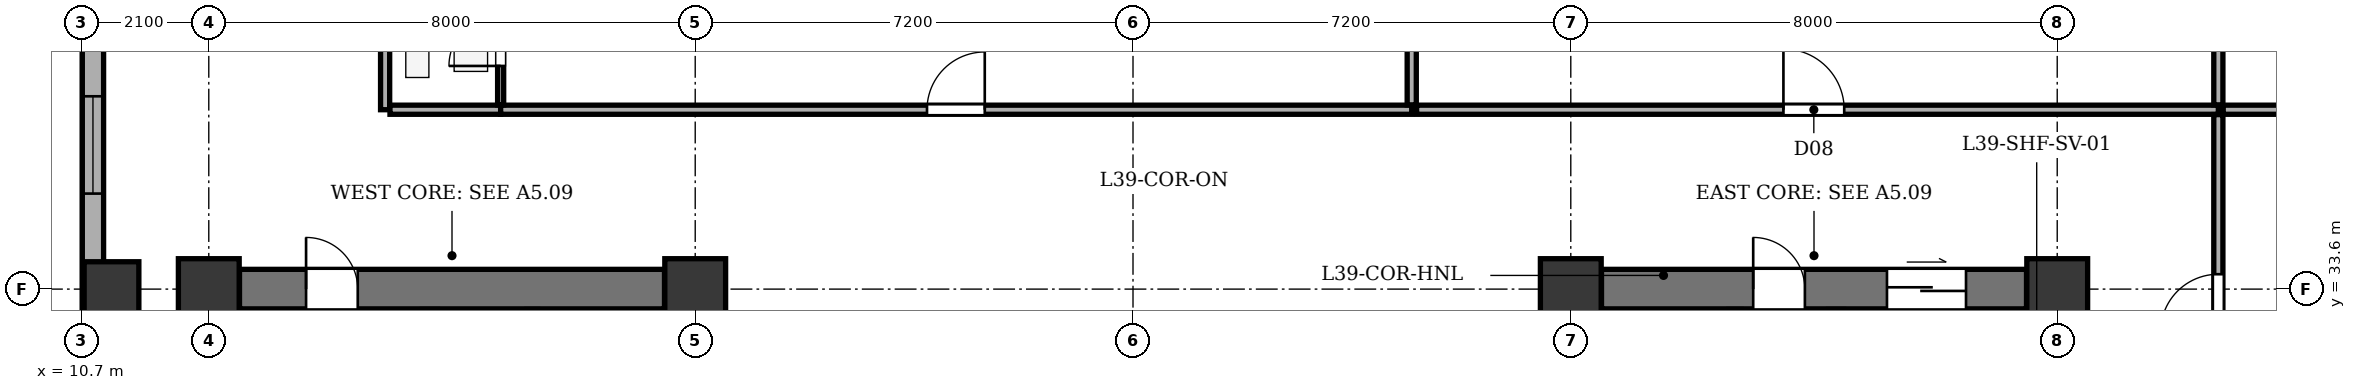
"""IFC4 building model, lengths in metres.
Left out: names, types, materials, properties, quantities, classifications, styles, units other than length and angle.
Written with IfcOpenShell. Run it as: python <this file> out.ifc"""

import sys

from ifc_helpers import new_model, si_unit, direction, frame, frame_2d, origin, origin_2d, place, context, subcontext, project, spatial, rectangle, extrude, element, fill, save


model = new_model("IFC4")
c1 = context("Model", 3, precision=1e-05, world=origin(), true_north=direction((0.0, 1.0)))
c2 = subcontext(c1, "Body", "Model", "MODEL_VIEW")
j1 = project(units=[si_unit("LENGTHUNIT", "METRE"), si_unit("PLANEANGLEUNIT", "RADIAN")], contexts=[c1])
p1 = place(None, origin())
s1 = spatial("IfcSite", under=j1, at=p1, CompositionType="ELEMENT")
p2 = place(p1, origin())
s2 = spatial("IfcBuilding", under=s1, at=p2, CompositionType="ELEMENT")
p3 = place(p2, frame((0.0, 0.0, 155.3)))
s3 = spatial("IfcBuildingStorey", under=s2, at=p3, CompositionType="ELEMENT", Elevation=155.3)
for number, where, z_axis, x_axis in (
    (1, (12.8, 33.6, 0.0), (0.0, 0.0, 1.0), (1.0, 0.0, 0.0)),
    (2, (20.8, 33.6, 0.0), (0.0, 0.0, 1.0), (1.0, 0.0, 0.0)),
    (3, (35.2, 33.6, 0.0), (0.0, 0.0, 1.0), (1.0, 0.0, 0.0)),
    (4, (43.2, 33.6, 0.0), (0.0, 0.0, 1.0), (1.0, 0.0, 0.0)),
):
    element("IfcColumn", number, at=place(p3, frame(where, z_axis=z_axis, x_axis=x_axis)), inside=s3, PredefinedType="COLUMN", context=c2, shape_type="SweptSolid", body=[
        extrude(rectangle(XDim=1.0, YDim=1.0, at=origin_2d()), origin(), (0.0, 0.0, 1.0), 3.5),
    ])
p4 = place(p3, frame((11.2, 33.6, 0.0), z_axis=(0.0, 0.0, 1.0), x_axis=(1.0, 0.0, 0.0)))
e5 = element("IfcColumn", 5, at=p4, inside=s3, PredefinedType="COLUMN", context=c2, shape_type="SweptSolid", body=[
    extrude(rectangle(XDim=0.9, YDim=0.9, at=origin_2d()), origin(), (0.0, 0.0, 1.0), 3.5),
])
p5 = place(p3, frame((10.895, 6.5, 0.0), z_axis=(0.0, 0.0, 1.0), x_axis=(0.0, 1.0, 0.0)))
e6 = element("IfcWall", 6, at=p5, inside=s3, PredefinedType="STANDARD", context=c2, shape_type="SweptSolid", body=[
    extrude(rectangle(XDim=35.0, YDim=0.35, at=frame_2d((17.5, 0.0))), origin(), (0.0, 0.0, 1.0), 2.785),
])
p6 = place(p5, frame((3.31, 0.0, 0.75)))
e7 = element("IfcOpeningElement", 7, at=p6, cuts=e6, PredefinedType="OPENING", context=c2, shape_type="SweptSolid", body=[
    extrude(rectangle(XDim=1.6, YDim=1.75, at=frame_2d((0.8, 0.875))), frame((0.0, 0.185, 0.0), z_axis=(0.0, -1.0, 0.0), x_axis=(1.0, 0.0, 0.0)), (0.0, 0.0, 1.0), 0.37),
])
p7 = place(p5, frame((9.216, 0.0, 0.75)))
e8 = element("IfcOpeningElement", 8, at=p7, cuts=e6, PredefinedType="OPENING", context=c2, shape_type="SweptSolid", body=[
    extrude(rectangle(XDim=2.1, YDim=1.75, at=frame_2d((1.05, 0.875))), frame((0.0, 0.185, 0.0), z_axis=(0.0, -1.0, 0.0), x_axis=(1.0, 0.0, 0.0)), (0.0, 0.0, 1.0), 0.37),
])
p8 = place(p5, frame((17.164, 0.0, 0.75)))
e9 = element("IfcOpeningElement", 9, at=p8, cuts=e6, PredefinedType="OPENING", context=c2, shape_type="SweptSolid", body=[
    extrude(rectangle(XDim=1.6, YDim=1.75, at=frame_2d((0.8, 0.875))), frame((0.0, 0.185, 0.0), z_axis=(0.0, -1.0, 0.0), x_axis=(1.0, 0.0, 0.0)), (0.0, 0.0, 1.0), 0.37),
])
p9 = place(p5, frame((22.386, 0.0, 0.75)))
e10 = element("IfcOpeningElement", 10, at=p9, cuts=e6, PredefinedType="OPENING", context=c2, shape_type="SweptSolid", body=[
    extrude(rectangle(XDim=2.1, YDim=1.75, at=frame_2d((1.05, 0.875))), frame((0.0, 0.185, 0.0), z_axis=(0.0, -1.0, 0.0), x_axis=(1.0, 0.0, 0.0)), (0.0, 0.0, 1.0), 0.37),
])
p10 = place(p5, frame((28.671, 0.0, 0.75)))
e11 = element("IfcOpeningElement", 11, at=p10, cuts=e6, PredefinedType="OPENING", context=c2, shape_type="SweptSolid", body=[
    extrude(rectangle(XDim=1.6, YDim=1.75, at=frame_2d((0.8, 0.875))), frame((0.0, 0.185, 0.0), z_axis=(0.0, -1.0, 0.0), x_axis=(1.0, 0.0, 0.0)), (0.0, 0.0, 1.0), 0.37),
])
p11 = place(p5, frame((31.755, 0.0, 0.75)))
e12 = element("IfcOpeningElement", 12, at=p11, cuts=e6, PredefinedType="OPENING", context=c2, shape_type="SweptSolid", body=[
    extrude(rectangle(XDim=1.6, YDim=1.75, at=frame_2d((0.8, 0.875))), frame((0.0, 0.185, 0.0), z_axis=(0.0, -1.0, 0.0), x_axis=(1.0, 0.0, 0.0)), (0.0, 0.0, 1.0), 0.37),
])
p12 = place(p3, frame((13.305, 33.6, 0.0), z_axis=(0.0, 0.0, 1.0), x_axis=(1.0, 0.0, 0.0)))
e13 = element("IfcWall", 13, at=p12, inside=s3, PredefinedType="SHEAR", context=c2, shape_type="SweptSolid", body=[
    extrude(rectangle(XDim=6.99, YDim=0.65, at=frame_2d((3.495, 0.0))), origin(), (0.0, 0.0, 1.0), 3.2),
])
p13 = place(p12, frame((1.095, 0.0, 0.0)))
e14 = element("IfcOpeningElement", 14, at=p13, cuts=e13, PredefinedType="OPENING", context=c2, shape_type="SweptSolid", body=[
    extrude(rectangle(XDim=0.85, YDim=2.02, at=frame_2d((0.425, 1.01))), frame((0.0, 0.335, 0.0), z_axis=(0.0, -1.0, 0.0), x_axis=(1.0, 0.0, 0.0)), (0.0, 0.0, 1.0), 0.67),
])
p14 = place(p3, frame((16.435, 21.135, 0.0), z_axis=(0.0, 0.0, 1.0), x_axis=(0.0, 1.0, 0.0)))
e15 = element("IfcWall", 15, at=p14, inside=s3, PredefinedType="SHEAR", context=c2, shape_type="SweptSolid", body=[
    extrude(rectangle(XDim=12.13, YDim=0.25, at=frame_2d((6.065, 0.0))), origin(), (0.0, 0.0, 1.0), 3.2),
])
p15 = place(p14, frame((0.515, 0.0, 0.0)))
e16 = element("IfcOpeningElement", 16, at=p15, cuts=e15, PredefinedType="OPENING", context=c2, shape_type="SweptSolid", body=[
    extrude(rectangle(XDim=1.2, YDim=2.15, at=frame_2d((0.6, 1.075))), frame((0.0, 0.135, 0.0), z_axis=(0.0, -1.0, 0.0), x_axis=(1.0, 0.0, 0.0)), (0.0, 0.0, 1.0), 0.27),
])
p16 = place(p14, frame((2.665, 0.0, 0.0)))
e17 = element("IfcOpeningElement", 17, at=p16, cuts=e15, PredefinedType="OPENING", context=c2, shape_type="SweptSolid", body=[
    extrude(rectangle(XDim=1.15, YDim=2.15, at=frame_2d((0.575, 1.075))), frame((0.0, 0.135, 0.0), z_axis=(0.0, -1.0, 0.0), x_axis=(1.0, 0.0, 0.0)), (0.0, 0.0, 1.0), 0.27),
])
p17 = place(p3, frame((18.12, 31.17, 0.0), z_axis=(0.0, 0.0, 1.0), x_axis=(0.0, 1.0, 0.0)))
e18 = element("IfcWall", 18, at=p17, inside=s3, PredefinedType="PARTITIONING", context=c2, shape_type="SweptSolid", body=[
    extrude(rectangle(XDim=2.095, YDim=0.18, at=frame_2d((1.047, 0.0))), origin(), (0.0, 0.0, 1.0), 3.2),
])
p18 = place(p3, frame((35.705, 33.6, 0.0), z_axis=(0.0, 0.0, 1.0), x_axis=(1.0, 0.0, 0.0)))
e19 = element("IfcWall", 19, at=p18, inside=s3, PredefinedType="SHEAR", context=c2, shape_type="SweptSolid", body=[
    extrude(rectangle(XDim=6.99, YDim=0.65, at=frame_2d((3.495, 0.0))), origin(), (0.0, 0.0, 1.0), 3.2),
])
p19 = place(p18, frame((4.695, 0.0, 0.0)))
e20 = element("IfcOpeningElement", 20, at=p19, cuts=e19, PredefinedType="OPENING", context=c2, shape_type="SweptSolid", body=[
    extrude(rectangle(XDim=1.3, YDim=2.15, at=frame_2d((0.65, 1.075))), frame((0.0, 0.335, 0.0), z_axis=(0.0, -1.0, 0.0), x_axis=(1.0, 0.0, 0.0)), (0.0, 0.0, 1.0), 0.67),
])
p20 = place(p18, frame((2.495, 0.0, 0.0)))
e21 = element("IfcOpeningElement", 21, at=p20, cuts=e19, PredefinedType="OPENING", context=c2, shape_type="SweptSolid", body=[
    extrude(rectangle(XDim=0.85, YDim=2.02, at=frame_2d((0.425, 1.01))), frame((0.0, 0.335, 0.0), z_axis=(0.0, -1.0, 0.0), x_axis=(1.0, 0.0, 0.0)), (0.0, 0.0, 1.0), 0.67),
])
p21 = place(p3, frame((39.565, 21.135, 0.0), z_axis=(0.0, 0.0, 1.0), x_axis=(0.0, 1.0, 0.0)))
e22 = element("IfcWall", 22, at=p21, inside=s3, PredefinedType="SHEAR", context=c2, shape_type="SweptSolid", body=[
    extrude(rectangle(XDim=12.13, YDim=0.25, at=frame_2d((6.065, 0.0))), origin(), (0.0, 0.0, 1.0), 3.2),
])
p22 = place(p21, frame((0.515, 0.0, 0.0)))
e23 = element("IfcOpeningElement", 23, at=p22, cuts=e22, PredefinedType="OPENING", context=c2, shape_type="SweptSolid", body=[
    extrude(rectangle(XDim=1.2, YDim=2.15, at=frame_2d((0.6, 1.075))), frame((0.0, 0.135, 0.0), z_axis=(0.0, -1.0, 0.0), x_axis=(1.0, 0.0, 0.0)), (0.0, 0.0, 1.0), 0.27),
])
p23 = place(p21, frame((2.665, 0.0, 0.0)))
e24 = element("IfcOpeningElement", 24, at=p23, cuts=e22, PredefinedType="OPENING", context=c2, shape_type="SweptSolid", body=[
    extrude(rectangle(XDim=1.15, YDim=2.15, at=frame_2d((0.575, 1.075))), frame((0.0, 0.135, 0.0), z_axis=(0.0, -1.0, 0.0), x_axis=(1.0, 0.0, 0.0)), (0.0, 0.0, 1.0), 0.27),
])
p24 = place(p3, frame((37.9, 25.27, 0.0), z_axis=(0.0, 0.0, 1.0), x_axis=(0.0, 1.0, 0.0)))
e25 = element("IfcWall", 25, at=p24, inside=s3, PredefinedType="SOLIDWALL", context=c2, shape_type="SweptSolid", body=[
    extrude(rectangle(XDim=7.995, YDim=0.2, at=frame_2d((3.998, 0.0))), origin(), (0.0, 0.0, 1.0), 3.2),
])
p25 = place(p3, frame((15.7, 36.55, 0.0), z_axis=(0.0, 0.0, 1.0), x_axis=(0.0, 1.0, 0.0)))
e26 = element("IfcWall", 26, at=p25, inside=s3, PredefinedType="PARTITIONING", context=c2, shape_type="SweptSolid", body=[
    extrude(rectangle(XDim=9.575, YDim=0.15, at=frame_2d((4.788, 0.0))), origin(), (0.0, 0.0, 1.0), 3.2),
])
p26 = place(p3, frame((15.78, 36.55, 0.0), z_axis=(0.0, 0.0, 1.0), x_axis=(1.0, 0.0, 0.0)))
e27 = element("IfcWall", 27, at=p26, inside=s3, PredefinedType="PARTITIONING", context=c2, shape_type="SweptSolid", body=[
    extrude(rectangle(XDim=1.82, YDim=0.15, at=frame_2d((0.91, 0.0))), origin(), (0.0, 0.0, 1.0), 3.2),
])
p27 = place(p3, frame((17.6, 36.55, 0.0), z_axis=(0.0, 0.0, 1.0), x_axis=(1.0, 0.0, 0.0)))
e28 = element("IfcWall", 28, at=p27, inside=s3, PredefinedType="PARTITIONING", context=c2, shape_type="SweptSolid", body=[
    extrude(rectangle(XDim=14.984, YDim=0.15, at=frame_2d((7.492, 0.0))), origin(), (0.0, 0.0, 1.0), 3.2),
])
p28 = place(p27, frame((7.012, 0.0, 0.0)))
e29 = element("IfcOpeningElement", 29, at=p28, cuts=e28, PredefinedType="OPENING", context=c2, shape_type="SweptSolid", body=[
    extrude(rectangle(XDim=0.95, YDim=2.1, at=frame_2d((0.475, 1.05))), frame((0.0, 0.085, 0.0), z_axis=(0.0, -1.0, 0.0), x_axis=(1.0, 0.0, 0.0)), (0.0, 0.0, 1.0), 0.17),
])
p29 = place(p3, frame((17.6, 36.63, 0.0), z_axis=(0.0, 0.0, 1.0), x_axis=(0.0, 1.0, 0.0)))
e30 = element("IfcWall", 30, at=p29, inside=s3, PredefinedType="PARTITIONING", context=c2, shape_type="SweptSolid", body=[
    extrude(rectangle(XDim=2.25, YDim=0.1, at=frame_2d((1.125, 0.0))), origin(), (0.0, 0.0, 1.0), 3.2),
])
p30 = place(p29, frame((0.64, 0.0, 0.0)))
e31 = element("IfcOpeningElement", 31, at=p30, cuts=e30, PredefinedType="OPENING", context=c2, shape_type="SweptSolid", body=[
    extrude(rectangle(XDim=0.85, YDim=2.05, at=frame_2d((0.425, 1.025))), frame((0.0, 0.06, 0.0), z_axis=(0.0, -1.0, 0.0), x_axis=(1.0, 0.0, 0.0)), (0.0, 0.0, 1.0), 0.12),
])
p31 = place(p3, frame((32.584, 36.63, 0.0), z_axis=(0.0, 0.0, 1.0), x_axis=(0.0, 1.0, 0.0)))
e32 = element("IfcWall", 32, at=p31, inside=s3, PredefinedType="PARTITIONING", context=c2, shape_type="SweptSolid", body=[
    extrude(rectangle(XDim=9.495, YDim=0.15, at=frame_2d((4.748, 0.0))), origin(), (0.0, 0.0, 1.0), 3.2),
])
p32 = place(p3, frame((32.664, 36.55, 0.0), z_axis=(0.0, 0.0, 1.0), x_axis=(1.0, 0.0, 0.0)))
e33 = element("IfcWall", 33, at=p32, inside=s3, PredefinedType="PARTITIONING", context=c2, shape_type="SweptSolid", body=[
    extrude(rectangle(XDim=13.186, YDim=0.15, at=frame_2d((6.593, 0.0))), origin(), (0.0, 0.0, 1.0), 3.2),
])
p33 = place(p32, frame((6.033, 0.0, 0.0)))
e34 = element("IfcOpeningElement", 34, at=p33, cuts=e33, PredefinedType="OPENING", context=c2, shape_type="SweptSolid", body=[
    extrude(rectangle(XDim=1.0, YDim=2.1, at=frame_2d((0.5, 1.05))), frame((0.0, 0.085, 0.0), z_axis=(0.0, -1.0, 0.0), x_axis=(1.0, 0.0, 0.0)), (0.0, 0.0, 1.0), 0.17),
])
p34 = place(p3, frame((45.85, 36.63, 0.0), z_axis=(0.0, 0.0, 1.0), x_axis=(0.0, 1.0, 0.0)))
e35 = element("IfcWall", 35, at=p34, inside=s3, PredefinedType="PARTITIONING", context=c2, shape_type="SweptSolid", body=[
    extrude(rectangle(XDim=9.495, YDim=0.15, at=frame_2d((4.748, 0.0))), origin(), (0.0, 0.0, 1.0), 3.2),
])
p35 = place(p3, frame((45.93, 36.55, 0.0), z_axis=(0.0, 0.0, 1.0), x_axis=(1.0, 0.0, 0.0)))
e36 = element("IfcWall", 36, at=p35, inside=s3, PredefinedType="PARTITIONING", context=c2, shape_type="SweptSolid", body=[
    extrude(rectangle(XDim=9.395, YDim=0.15, at=frame_2d((4.698, 0.0))), origin(), (0.0, 0.0, 1.0), 3.2),
])
p36 = place(p3, frame((45.85, 30.28, 0.0), z_axis=(0.0, 0.0, 1.0), x_axis=(0.0, 1.0, 0.0)))
e37 = element("IfcWall", 37, at=p36, inside=s3, PredefinedType="PARTITIONING", context=c2, shape_type="SweptSolid", body=[
    extrude(rectangle(XDim=6.19, YDim=0.15, at=frame_2d((3.095, 0.0))), origin(), (0.0, 0.0, 1.0), 3.2),
])
p37 = place(p36, frame((2.615, 0.0, 0.0)))
e38 = element("IfcOpeningElement", 38, at=p37, cuts=e37, PredefinedType="OPENING", context=c2, shape_type="SweptSolid", body=[
    extrude(rectangle(XDim=0.95, YDim=2.1, at=frame_2d((0.475, 1.05))), frame((0.0, 0.085, 0.0), z_axis=(0.0, -1.0, 0.0), x_axis=(1.0, 0.0, 0.0)), (0.0, 0.0, 1.0), 0.17),
])
p38 = place(p10, origin())
e39 = element("IfcWindow", 39, at=p38, inside=s3, PartitioningType="SINGLE_PANEL", PredefinedType="WINDOW", context=c2, shape_type="SweptSolid", body=[
    extrude(rectangle(XDim=1.6, YDim=1.75, at=frame_2d((0.8, 0.875))), frame((0.0, -0.01, 0.0), z_axis=(0.0, -1.0, 0.0), x_axis=(1.0, 0.0, 0.0)), (0.0, 0.0, 1.0), 0.06),
])
fill(e11, e39)
p39 = place(p13, origin())
e40 = element("IfcDoor", 40, at=p39, inside=s3, OperationType="SINGLE_SWING_LEFT", PredefinedType="DOOR", context=c2, shape_type="SweptSolid", body=[
    extrude(rectangle(XDim=0.85, YDim=2.02, at=frame_2d((0.425, 1.01))), frame((0.0, 0.025, 0.0), z_axis=(0.0, -1.0, 0.0), x_axis=(1.0, 0.0, 0.0)), (0.0, 0.0, 1.0), 0.05),
])
fill(e14, e40)
p40 = place(p19, origin())
e41 = element("IfcDoor", 41, at=p40, inside=s3, OperationType="DOUBLE_DOOR_SLIDING", PredefinedType="DOOR", context=c2, shape_type="SweptSolid", body=[
    extrude(rectangle(XDim=1.3, YDim=2.15, at=frame_2d((0.65, 1.075))), frame((0.0, 0.025, 0.0), z_axis=(0.0, -1.0, 0.0), x_axis=(1.0, 0.0, 0.0)), (0.0, 0.0, 1.0), 0.05),
])
fill(e20, e41)
p41 = place(p20, origin())
e42 = element("IfcDoor", 42, at=p41, inside=s3, OperationType="SINGLE_SWING_LEFT", PredefinedType="DOOR", context=c2, shape_type="SweptSolid", body=[
    extrude(rectangle(XDim=0.85, YDim=2.02, at=frame_2d((0.425, 1.01))), frame((0.0, 0.025, 0.0), z_axis=(0.0, -1.0, 0.0), x_axis=(1.0, 0.0, 0.0)), (0.0, 0.0, 1.0), 0.05),
])
fill(e21, e42)
p42 = place(p30, origin())
e43 = element("IfcDoor", 43, at=p42, inside=s3, OperationType="SINGLE_SWING_LEFT", PredefinedType="DOOR", context=c2, shape_type="SweptSolid", body=[
    extrude(rectangle(XDim=0.85, YDim=2.05, at=frame_2d((0.425, 1.025))), frame((0.0, 0.025, 0.0), z_axis=(0.0, -1.0, 0.0), x_axis=(1.0, 0.0, 0.0)), (0.0, 0.0, 1.0), 0.05),
])
fill(e31, e43)
p43 = place(p28, origin())
e44 = element("IfcDoor", 44, at=p43, inside=s3, OperationType="SINGLE_SWING_RIGHT", PredefinedType="DOOR", context=c2, shape_type="SweptSolid", body=[
    extrude(rectangle(XDim=0.95, YDim=2.1, at=frame_2d((0.475, 1.05))), frame((0.0, 0.025, 0.0), z_axis=(0.0, -1.0, 0.0), x_axis=(1.0, 0.0, 0.0)), (0.0, 0.0, 1.0), 0.05),
])
fill(e29, e44)
p44 = place(p33, origin())
e45 = element("IfcDoor", 45, at=p44, inside=s3, OperationType="SINGLE_SWING_LEFT", PredefinedType="DOOR", context=c2, shape_type="SweptSolid", body=[
    extrude(rectangle(XDim=1.0, YDim=2.1, at=frame_2d((0.5, 1.05))), frame((0.0, 0.025, 0.0), z_axis=(0.0, -1.0, 0.0), x_axis=(1.0, 0.0, 0.0)), (0.0, 0.0, 1.0), 0.05),
])
fill(e34, e45)
p45 = place(p37, origin())
e46 = element("IfcDoor", 46, at=p45, inside=s3, OperationType="SINGLE_SWING_LEFT", PredefinedType="DOOR", context=c2, shape_type="SweptSolid", body=[
    extrude(rectangle(XDim=0.95, YDim=2.1, at=frame_2d((0.475, 1.05))), frame((0.0, 0.025, 0.0), z_axis=(0.0, -1.0, 0.0), x_axis=(1.0, 0.0, 0.0)), (0.0, 0.0, 1.0), 0.05),
])
fill(e38, e46)
save(model, sys.argv[1])
